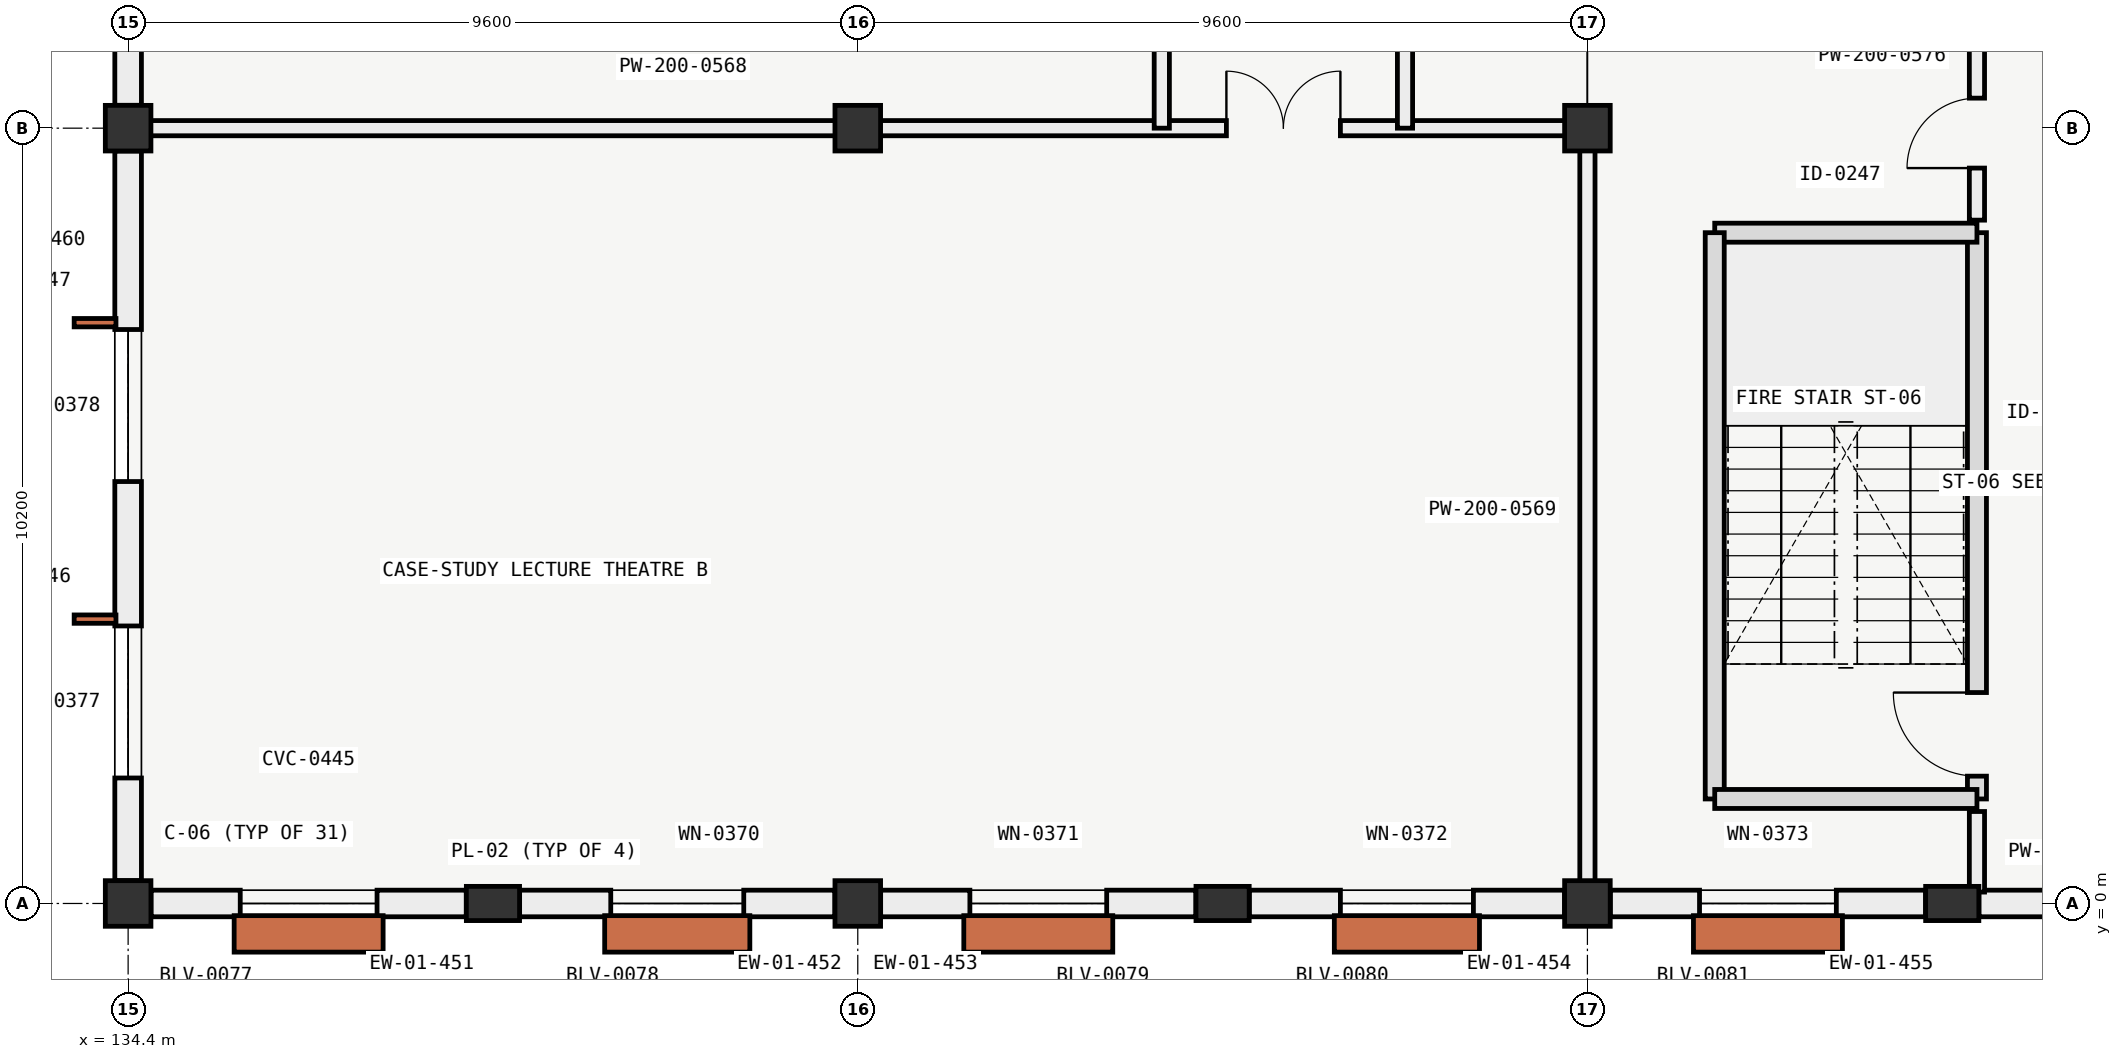
"""IFC4 building model, lengths in metres.
Left out: names, types, materials, properties, quantities, classifications, styles, units other than length and angle.
Written with IfcOpenShell. Run it as: python <this file> out.ifc"""

import sys

from ifc_helpers import new_model, si_unit, direction, frame, frame_2d, origin, origin_2d, place, context, subcontext, project, spatial, rectangle, extrude, element, fill, save


model = new_model("IFC4")
c1 = context("Model", 3, precision=1e-05, world=origin(), true_north=direction((0.0, 1.0)))
c2 = subcontext(c1, "Body", "Model", "MODEL_VIEW")
j1 = project(units=[si_unit("LENGTHUNIT", "METRE"), si_unit("PLANEANGLEUNIT", "RADIAN")], contexts=[c1])
p1 = place(None, origin())
s1 = spatial("IfcSite", under=j1, at=p1, CompositionType="ELEMENT")
p2 = place(p1, origin())
s2 = spatial("IfcBuilding", under=s1, at=p2, CompositionType="ELEMENT")
p3 = place(p2, frame((0.0, 0.0, 9.6)))
s3 = spatial("IfcBuildingStorey", under=s2, at=p3, CompositionType="ELEMENT", Elevation=9.6)
for number, where, z_axis, x_axis in (
    (1, (134.4, 0.0, 0.0), (0.0, 0.0, 1.0), (1.0, 0.0, 0.0)),
    (2, (134.4, 10.2, 0.0), (0.0, 0.0, 1.0), (1.0, 0.0, 0.0)),
    (3, (144.0, 0.0, 0.0), (0.0, 0.0, 1.0), (1.0, 0.0, 0.0)),
    (4, (144.0, 10.2, 0.0), (0.0, 0.0, 1.0), (1.0, 0.0, 0.0)),
    (5, (153.6, 0.0, 0.0), (0.0, 0.0, 1.0), (1.0, 0.0, 0.0)),
    (6, (153.6, 10.2, 0.0), (0.0, 0.0, 1.0), (1.0, 0.0, 0.0)),
):
    element("IfcColumn", number, at=place(p3, frame(where, z_axis=z_axis, x_axis=x_axis)), inside=s3, PredefinedType="COLUMN", context=c2, shape_type="SweptSolid", body=[
        extrude(rectangle(XDim=0.6, YDim=0.6, at=origin_2d()), origin(), (0.0, 0.0, 1.0), 4.2),
    ])
for number, where, z_axis, x_axis in (
    (7, (139.2, 0.0, 0.0), (0.0, 0.0, 1.0), (0.0, 1.0, 0.0)),
    (8, (148.8, 0.0, 0.0), (0.0, 0.0, 1.0), (0.0, 1.0, 0.0)),
    (9, (158.4, 0.0, 0.0), (0.0, 0.0, 1.0), (0.0, 1.0, 0.0)),
):
    element("IfcColumn", number, at=place(p3, frame(where, z_axis=z_axis, x_axis=x_axis)), inside=s3, PredefinedType="PILASTER", context=c2, shape_type="SweptSolid", body=[
        extrude(rectangle(XDim=0.45, YDim=0.7, at=origin_2d()), origin(), (0.0, 0.0, 1.0), 4.2),
    ])
p4 = place(p3, frame((138.849, 0.0, 0.0), z_axis=(0.0, 0.0, 1.0), x_axis=(-1.0, 0.0, 0.0)))
e10 = element("IfcWall", 10, at=p4, inside=s3, PredefinedType="SOLIDWALL", context=c2, shape_type="SweptSolid", body=[
    extrude(rectangle(XDim=4.148, YDim=0.35, at=frame_2d((2.074, 0.0))), origin(), (0.0, 0.0, 1.0), 3.25),
])
p5 = place(p4, frame((1.174, 0.0, 0.85)))
e11 = element("IfcOpeningElement", 11, at=p5, cuts=e10, PredefinedType="OPENING", context=c2, shape_type="SweptSolid", body=[
    extrude(rectangle(XDim=1.8, YDim=2.1, at=frame_2d((0.9, 1.05))), frame((0.0, 0.185, 0.0), z_axis=(0.0, -1.0, 0.0), x_axis=(1.0, 0.0, 0.0)), (0.0, 0.0, 1.0), 0.37),
])
p6 = place(p3, frame((143.699, 0.0, 0.0), z_axis=(0.0, 0.0, 1.0), x_axis=(-1.0, 0.0, 0.0)))
e12 = element("IfcWall", 12, at=p6, inside=s3, PredefinedType="SOLIDWALL", context=c2, shape_type="SweptSolid", body=[
    extrude(rectangle(XDim=4.148, YDim=0.35, at=frame_2d((2.074, 0.0))), origin(), (0.0, 0.0, 1.0), 3.25),
])
p7 = place(p6, frame((1.199, 0.0, 0.85)))
e13 = element("IfcOpeningElement", 13, at=p7, cuts=e12, PredefinedType="OPENING", context=c2, shape_type="SweptSolid", body=[
    extrude(rectangle(XDim=1.75, YDim=2.05, at=frame_2d((0.875, 1.025))), frame((0.0, 0.185, 0.0), z_axis=(0.0, -1.0, 0.0), x_axis=(1.0, 0.0, 0.0)), (0.0, 0.0, 1.0), 0.37),
])
p8 = place(p3, frame((148.449, 0.0, 0.0), z_axis=(0.0, 0.0, 1.0), x_axis=(-1.0, 0.0, 0.0)))
e14 = element("IfcWall", 14, at=p8, inside=s3, PredefinedType="SOLIDWALL", context=c2, shape_type="SweptSolid", body=[
    extrude(rectangle(XDim=4.148, YDim=0.35, at=frame_2d((2.074, 0.0))), origin(), (0.0, 0.0, 1.0), 3.25),
])
p9 = place(p8, frame((1.174, 0.0, 0.85)))
e15 = element("IfcOpeningElement", 15, at=p9, cuts=e14, PredefinedType="OPENING", context=c2, shape_type="SweptSolid", body=[
    extrude(rectangle(XDim=1.8, YDim=2.1, at=frame_2d((0.9, 1.05))), frame((0.0, 0.185, 0.0), z_axis=(0.0, -1.0, 0.0), x_axis=(1.0, 0.0, 0.0)), (0.0, 0.0, 1.0), 0.37),
])
p10 = place(p3, frame((153.299, 0.0, 0.0), z_axis=(0.0, 0.0, 1.0), x_axis=(-1.0, 0.0, 0.0)))
e16 = element("IfcWall", 16, at=p10, inside=s3, PredefinedType="SOLIDWALL", context=c2, shape_type="SweptSolid", body=[
    extrude(rectangle(XDim=4.148, YDim=0.35, at=frame_2d((2.074, 0.0))), origin(), (0.0, 0.0, 1.0), 3.25),
])
p11 = place(p10, frame((1.199, 0.0, 0.85)))
e17 = element("IfcOpeningElement", 17, at=p11, cuts=e16, PredefinedType="OPENING", context=c2, shape_type="SweptSolid", body=[
    extrude(rectangle(XDim=1.75, YDim=2.05, at=frame_2d((0.875, 1.025))), frame((0.0, 0.185, 0.0), z_axis=(0.0, -1.0, 0.0), x_axis=(1.0, 0.0, 0.0)), (0.0, 0.0, 1.0), 0.37),
])
p12 = place(p3, frame((158.049, 0.0, 0.0), z_axis=(0.0, 0.0, 1.0), x_axis=(-1.0, 0.0, 0.0)))
e18 = element("IfcWall", 18, at=p12, inside=s3, PredefinedType="SOLIDWALL", context=c2, shape_type="SweptSolid", body=[
    extrude(rectangle(XDim=4.148, YDim=0.35, at=frame_2d((2.074, 0.0))), origin(), (0.0, 0.0, 1.0), 3.25),
])
p13 = place(p12, frame((1.174, 0.0, 0.85)))
e19 = element("IfcOpeningElement", 19, at=p13, cuts=e18, PredefinedType="OPENING", context=c2, shape_type="SweptSolid", body=[
    extrude(rectangle(XDim=1.8, YDim=2.1, at=frame_2d((0.9, 1.05))), frame((0.0, 0.185, 0.0), z_axis=(0.0, -1.0, 0.0), x_axis=(1.0, 0.0, 0.0)), (0.0, 0.0, 1.0), 0.37),
])
p14 = place(p3, frame((161.95, 0.0, 0.0), z_axis=(0.0, 0.0, 1.0), x_axis=(-1.0, 0.0, 0.0)))
e20 = element("IfcWall", 20, at=p14, inside=s3, PredefinedType="SOLIDWALL", context=c2, shape_type="SweptSolid", body=[
    extrude(rectangle(XDim=3.199, YDim=0.35, at=frame_2d((1.6, 0.0))), origin(), (0.0, 0.0, 1.0), 3.25),
])
p15 = place(p14, frame((1.05, 0.0, 0.75)))
e21 = element("IfcOpeningElement", 21, at=p15, cuts=e20, PredefinedType="OPENING", context=c2, shape_type="SweptSolid", body=[
    extrude(rectangle(XDim=1.1, YDim=2.3, at=frame_2d((0.55, 1.15))), frame((0.0, 0.185, 0.0), z_axis=(0.0, -1.0, 0.0), x_axis=(1.0, 0.0, 0.0)), (0.0, 0.0, 1.0), 0.37),
])
p16 = place(p3, frame((134.4, 0.301, 0.0), z_axis=(0.0, 0.0, 1.0), x_axis=(0.0, 1.0, 0.0)))
e22 = element("IfcWall", 22, at=p16, inside=s3, PredefinedType="SOLIDWALL", context=c2, shape_type="SweptSolid", body=[
    extrude(rectangle(XDim=9.598, YDim=0.35, at=frame_2d((4.799, 0.0))), origin(), (0.0, 0.0, 1.0), 3.25),
])
p17 = place(p16, frame((1.35, 0.0, 0.85)))
e23 = element("IfcOpeningElement", 23, at=p17, cuts=e22, PredefinedType="OPENING", context=c2, shape_type="SweptSolid", body=[
    extrude(rectangle(XDim=2.0, YDim=1.35, at=frame_2d((1.0, 0.675))), frame((0.0, 0.185, 0.0), z_axis=(0.0, -1.0, 0.0), x_axis=(1.0, 0.0, 0.0)), (0.0, 0.0, 1.0), 0.37),
])
p18 = place(p16, frame((5.25, 0.0, 0.85)))
e24 = element("IfcOpeningElement", 24, at=p18, cuts=e22, PredefinedType="OPENING", context=c2, shape_type="SweptSolid", body=[
    extrude(rectangle(XDim=2.0, YDim=1.35, at=frame_2d((1.0, 0.675))), frame((0.0, 0.185, 0.0), z_axis=(0.0, -1.0, 0.0), x_axis=(1.0, 0.0, 0.0)), (0.0, 0.0, 1.0), 0.37),
])
p19 = place(p3, frame((134.4, 10.501, 0.0), z_axis=(0.0, 0.0, 1.0), x_axis=(0.0, 1.0, 0.0)))
e25 = element("IfcWall", 25, at=p19, inside=s3, PredefinedType="SOLIDWALL", context=c2, shape_type="SweptSolid", body=[
    extrude(rectangle(XDim=9.598, YDim=0.35, at=frame_2d((4.799, 0.0))), origin(), (0.0, 0.0, 1.0), 3.25),
])
p20 = place(p19, frame((1.35, 0.0, 0.85)))
e26 = element("IfcOpeningElement", 26, at=p20, cuts=e25, PredefinedType="OPENING", context=c2, shape_type="SweptSolid", body=[
    extrude(rectangle(XDim=2.0, YDim=1.35, at=frame_2d((1.0, 0.675))), frame((0.0, 0.185, 0.0), z_axis=(0.0, -1.0, 0.0), x_axis=(1.0, 0.0, 0.0)), (0.0, 0.0, 1.0), 0.37),
])
p21 = place(p19, frame((6.219, 0.0, 0.85)))
e27 = element("IfcOpeningElement", 27, at=p21, cuts=e25, PredefinedType="OPENING", context=c2, shape_type="SweptSolid", body=[
    extrude(rectangle(XDim=2.0, YDim=1.35, at=frame_2d((1.0, 0.675))), frame((0.0, 0.185, 0.0), z_axis=(0.0, -1.0, 0.0), x_axis=(1.0, 0.0, 0.0)), (0.0, 0.0, 1.0), 0.37),
])
p22 = place(p3, frame((158.725, 1.375, 0.0), z_axis=(0.0, 0.0, 1.0), x_axis=(0.0, 1.0, 0.0)))
e28 = element("IfcWall", 28, at=p22, inside=s3, PredefinedType="SOLIDWALL", context=c2, shape_type="SweptSolid", body=[
    extrude(rectangle(XDim=7.45, YDim=0.25, at=frame_2d((3.725, 0.0))), origin(), (0.0, 0.0, 1.0), 3.95),
])
p23 = place(p22, frame((0.3, 0.0, 0.0)))
e29 = element("IfcOpeningElement", 29, at=p23, cuts=e28, PredefinedType="OPENING", context=c2, shape_type="SweptSolid", body=[
    extrude(rectangle(XDim=1.1, YDim=2.2, at=frame_2d((0.55, 1.1))), frame((0.0, 0.135, 0.0), z_axis=(0.0, -1.0, 0.0), x_axis=(1.0, 0.0, 0.0)), (0.0, 0.0, 1.0), 0.27),
])
p24 = place(p3, frame((158.725, 8.825, 0.0), z_axis=(0.0, 0.0, 1.0), x_axis=(-1.0, 0.0, 0.0)))
e30 = element("IfcWall", 30, at=p24, inside=s3, PredefinedType="SOLIDWALL", context=c2, shape_type="SweptSolid", body=[
    extrude(rectangle(XDim=3.45, YDim=0.25, at=frame_2d((1.725, 0.0))), origin(), (0.0, 0.0, 1.0), 3.95),
])
p25 = place(p3, frame((155.275, 8.825, 0.0), z_axis=(0.0, 0.0, 1.0), x_axis=(0.0, -1.0, 0.0)))
e31 = element("IfcWall", 31, at=p25, inside=s3, PredefinedType="SOLIDWALL", context=c2, shape_type="SweptSolid", body=[
    extrude(rectangle(XDim=7.45, YDim=0.25, at=frame_2d((3.725, 0.0))), origin(), (0.0, 0.0, 1.0), 3.95),
])
p26 = place(p3, frame((155.275, 1.375, 0.0), z_axis=(0.0, 0.0, 1.0), x_axis=(1.0, 0.0, 0.0)))
e32 = element("IfcWall", 32, at=p26, inside=s3, PredefinedType="SOLIDWALL", context=c2, shape_type="SweptSolid", body=[
    extrude(rectangle(XDim=3.45, YDim=0.25, at=frame_2d((1.725, 0.0))), origin(), (0.0, 0.0, 1.0), 3.95),
])
p27 = place(p3, frame((134.55, 10.2, 0.0), z_axis=(0.0, 0.0, 1.0), x_axis=(1.0, 0.0, 0.0)))
e33 = element("IfcWall", 33, at=p27, inside=s3, PredefinedType="PARTITIONING", context=c2, shape_type="SweptSolid", body=[
    extrude(rectangle(XDim=19.05, YDim=0.2, at=frame_2d((9.525, 0.0))), origin(), (0.0, 0.0, 1.0), 3.23),
])
p28 = place(p27, frame((14.3, 0.0, 0.0)))
e34 = element("IfcOpeningElement", 34, at=p28, cuts=e33, PredefinedType="OPENING", context=c2, shape_type="SweptSolid", body=[
    extrude(rectangle(XDim=1.5, YDim=2.2, at=frame_2d((0.75, 1.1))), frame((0.0, 0.11, 0.0), z_axis=(0.0, -1.0, 0.0), x_axis=(1.0, 0.0, 0.0)), (0.0, 0.0, 1.0), 0.22),
])
p29 = place(p3, frame((153.6, 0.15, 0.0), z_axis=(0.0, 0.0, 1.0), x_axis=(0.0, 1.0, 0.0)))
e35 = element("IfcWall", 35, at=p29, inside=s3, PredefinedType="PARTITIONING", context=c2, shape_type="SweptSolid", body=[
    extrude(rectangle(XDim=10.05, YDim=0.2, at=frame_2d((5.025, 0.0))), origin(), (0.0, 0.0, 1.0), 3.23),
])
p30 = place(p3, frame((148.0, 10.2, 0.0), z_axis=(0.0, 0.0, 1.0), x_axis=(0.0, 1.0, 0.0)))
e36 = element("IfcWall", 36, at=p30, inside=s3, PredefinedType="PARTITIONING", context=c2, shape_type="SweptSolid", body=[
    extrude(rectangle(XDim=14.0, YDim=0.2, at=frame_2d((7.0, 0.0))), origin(), (0.0, 0.0, 1.0), 3.23),
])
p31 = place(p30, frame((3.2, 0.0, 0.0)))
e37 = element("IfcOpeningElement", 37, at=p31, cuts=e36, PredefinedType="OPENING", context=c2, shape_type="SweptSolid", body=[
    extrude(rectangle(XDim=0.92, YDim=2.1, at=frame_2d((0.46, 1.05))), frame((0.0, 0.11, 0.0), z_axis=(0.0, -1.0, 0.0), x_axis=(1.0, 0.0, 0.0)), (0.0, 0.0, 1.0), 0.22),
])
p32 = place(p30, frame((10.8, 0.0, 0.0)))
e38 = element("IfcOpeningElement", 38, at=p32, cuts=e36, PredefinedType="OPENING", context=c2, shape_type="SweptSolid", body=[
    extrude(rectangle(XDim=1.5, YDim=2.2, at=frame_2d((0.75, 1.1))), frame((0.0, 0.11, 0.0), z_axis=(0.0, -1.0, 0.0), x_axis=(1.0, 0.0, 0.0)), (0.0, 0.0, 1.0), 0.22),
])
p33 = place(p3, frame((151.2, 10.2, 0.0), z_axis=(0.0, 0.0, 1.0), x_axis=(0.0, 1.0, 0.0)))
e39 = element("IfcWall", 39, at=p33, inside=s3, PredefinedType="PARTITIONING", context=c2, shape_type="SweptSolid", body=[
    extrude(rectangle(XDim=14.0, YDim=0.2, at=frame_2d((7.0, 0.0))), origin(), (0.0, 0.0, 1.0), 3.23),
])
p34 = place(p33, frame((6.8, 0.0, 0.0)))
e40 = element("IfcOpeningElement", 40, at=p34, cuts=e39, PredefinedType="OPENING", context=c2, shape_type="SweptSolid", body=[
    extrude(rectangle(XDim=0.92, YDim=2.1, at=frame_2d((0.46, 1.05))), frame((0.0, 0.11, 0.0), z_axis=(0.0, -1.0, 0.0), x_axis=(1.0, 0.0, 0.0)), (0.0, 0.0, 1.0), 0.22),
])
p35 = place(p3, frame((158.725, 0.15, 0.0), z_axis=(0.0, 0.0, 1.0), x_axis=(0.0, 1.0, 0.0)))
e41 = element("IfcWall", 41, at=p35, inside=s3, PredefinedType="PARTITIONING", context=c2, shape_type="SweptSolid", body=[
    extrude(rectangle(XDim=1.06, YDim=0.2, at=frame_2d((0.53, 0.0))), origin(), (0.0, 0.0, 1.0), 3.85),
])
p36 = place(p3, frame((158.725, 8.99, 0.0), z_axis=(0.0, 0.0, 1.0), x_axis=(0.0, 1.0, 0.0)))
e42 = element("IfcWall", 42, at=p36, inside=s3, PredefinedType="PARTITIONING", context=c2, shape_type="SweptSolid", body=[
    extrude(rectangle(XDim=2.42, YDim=0.2, at=frame_2d((1.21, 0.0))), origin(), (0.0, 0.0, 1.0), 3.23),
])
p37 = place(p36, frame((0.685, 0.0, 0.0)))
e43 = element("IfcOpeningElement", 43, at=p37, cuts=e42, PredefinedType="OPENING", context=c2, shape_type="SweptSolid", body=[
    extrude(rectangle(XDim=0.92, YDim=2.1, at=frame_2d((0.46, 1.05))), frame((0.0, 0.11, 0.0), z_axis=(0.0, -1.0, 0.0), x_axis=(1.0, 0.0, 0.0)), (0.0, 0.0, 1.0), 0.22),
])
p38 = place(p5, origin())
e44 = element("IfcWindow", 44, at=p38, inside=s3, PartitioningType="SINGLE_PANEL", PredefinedType="WINDOW", context=c2, shape_type="SweptSolid", body=[
    extrude(rectangle(XDim=1.8, YDim=2.1, at=frame_2d((0.9, 1.05))), frame((0.0, 0.03, 0.0), z_axis=(0.0, -1.0, 0.0), x_axis=(1.0, 0.0, 0.0)), (0.0, 0.0, 1.0), 0.06),
])
fill(e11, e44)
p39 = place(p7, origin())
e45 = element("IfcWindow", 45, at=p39, inside=s3, PartitioningType="SINGLE_PANEL", PredefinedType="WINDOW", context=c2, shape_type="SweptSolid", body=[
    extrude(rectangle(XDim=1.75, YDim=2.05, at=frame_2d((0.875, 1.025))), frame((0.0, 0.03, 0.0), z_axis=(0.0, -1.0, 0.0), x_axis=(1.0, 0.0, 0.0)), (0.0, 0.0, 1.0), 0.06),
])
fill(e13, e45)
p40 = place(p9, origin())
e46 = element("IfcWindow", 46, at=p40, inside=s3, PartitioningType="SINGLE_PANEL", PredefinedType="WINDOW", context=c2, shape_type="SweptSolid", body=[
    extrude(rectangle(XDim=1.8, YDim=2.1, at=frame_2d((0.9, 1.05))), frame((0.0, 0.03, 0.0), z_axis=(0.0, -1.0, 0.0), x_axis=(1.0, 0.0, 0.0)), (0.0, 0.0, 1.0), 0.06),
])
fill(e15, e46)
p41 = place(p11, origin())
e47 = element("IfcWindow", 47, at=p41, inside=s3, PartitioningType="SINGLE_PANEL", PredefinedType="WINDOW", context=c2, shape_type="SweptSolid", body=[
    extrude(rectangle(XDim=1.75, YDim=2.05, at=frame_2d((0.875, 1.025))), frame((0.0, 0.03, 0.0), z_axis=(0.0, -1.0, 0.0), x_axis=(1.0, 0.0, 0.0)), (0.0, 0.0, 1.0), 0.06),
])
fill(e17, e47)
p42 = place(p13, origin())
e48 = element("IfcWindow", 48, at=p42, inside=s3, PartitioningType="SINGLE_PANEL", PredefinedType="WINDOW", context=c2, shape_type="SweptSolid", body=[
    extrude(rectangle(XDim=1.8, YDim=2.1, at=frame_2d((0.9, 1.05))), frame((0.0, 0.03, 0.0), z_axis=(0.0, -1.0, 0.0), x_axis=(1.0, 0.0, 0.0)), (0.0, 0.0, 1.0), 0.06),
])
fill(e19, e48)
p43 = place(p17, origin())
e49 = element("IfcWindow", 49, at=p43, inside=s3, PartitioningType="SINGLE_PANEL", PredefinedType="WINDOW", context=c2, shape_type="SweptSolid", body=[
    extrude(rectangle(XDim=2.0, YDim=1.35, at=frame_2d((1.0, 0.675))), frame((0.0, 0.03, 0.0), z_axis=(0.0, -1.0, 0.0), x_axis=(1.0, 0.0, 0.0)), (0.0, 0.0, 1.0), 0.06),
])
fill(e23, e49)
p44 = place(p18, origin())
e50 = element("IfcWindow", 50, at=p44, inside=s3, PartitioningType="SINGLE_PANEL", PredefinedType="WINDOW", context=c2, shape_type="SweptSolid", body=[
    extrude(rectangle(XDim=2.0, YDim=1.35, at=frame_2d((1.0, 0.675))), frame((0.0, 0.03, 0.0), z_axis=(0.0, -1.0, 0.0), x_axis=(1.0, 0.0, 0.0)), (0.0, 0.0, 1.0), 0.06),
])
fill(e24, e50)
p45 = place(p23, origin())
e51 = element("IfcDoor", 51, at=p45, inside=s3, OperationType="SINGLE_SWING_RIGHT", PredefinedType="DOOR", context=c2, shape_type="SweptSolid", body=[
    extrude(rectangle(XDim=1.1, YDim=2.2, at=frame_2d((0.55, 1.1))), frame((0.0, 0.025, 0.0), z_axis=(0.0, -1.0, 0.0), x_axis=(1.0, 0.0, 0.0)), (0.0, 0.0, 1.0), 0.05),
])
fill(e29, e51)
p46 = place(p28, origin())
e52 = element("IfcDoor", 52, at=p46, inside=s3, OperationType="DOUBLE_DOOR_SINGLE_SWING", PredefinedType="DOOR", context=c2, shape_type="SweptSolid", body=[
    extrude(rectangle(XDim=1.5, YDim=2.2, at=frame_2d((0.75, 1.1))), frame((0.0, 0.025, 0.0), z_axis=(0.0, -1.0, 0.0), x_axis=(1.0, 0.0, 0.0)), (0.0, 0.0, 1.0), 0.05),
])
fill(e34, e52)
p47 = place(p37, origin())
e53 = element("IfcDoor", 53, at=p47, inside=s3, OperationType="SINGLE_SWING_LEFT", PredefinedType="DOOR", context=c2, shape_type="SweptSolid", body=[
    extrude(rectangle(XDim=0.92, YDim=2.1, at=frame_2d((0.46, 1.05))), frame((0.0, 0.025, 0.0), z_axis=(0.0, -1.0, 0.0), x_axis=(1.0, 0.0, 0.0)), (0.0, 0.0, 1.0), 0.05),
])
fill(e43, e53)
save(model, sys.argv[1])
